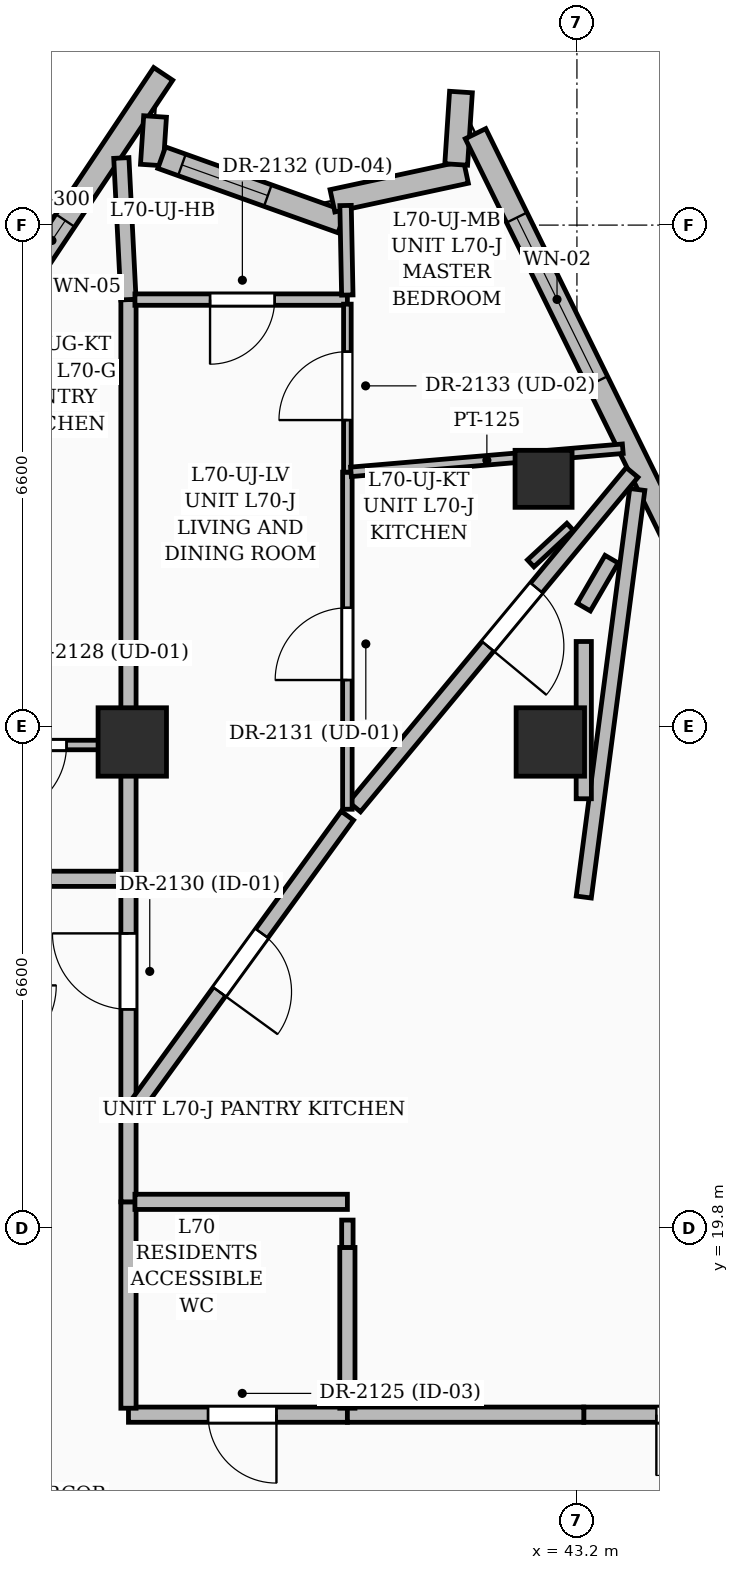
"""IFC4 building model, lengths in metres.
Left out: names, types, materials, properties, quantities, classifications, styles, units other than length and angle.
Written with IfcOpenShell. Run it as: python <this file> out.ifc"""

import sys

from ifc_helpers import new_model, si_unit, direction, frame, frame_2d, origin, origin_2d, place, context, subcontext, project, spatial, rectangle, extrude, element, fill, save


model = new_model("IFC4")
c1 = context("Model", 3, precision=1e-05, world=origin(), true_north=direction((0.0, 1.0)))
c2 = subcontext(c1, "Body", "Model", "MODEL_VIEW")
j1 = project(units=[si_unit("LENGTHUNIT", "METRE"), si_unit("PLANEANGLEUNIT", "RADIAN")], contexts=[c1])
p1 = place(None, origin())
s1 = spatial("IfcSite", under=j1, at=p1, CompositionType="ELEMENT")
p2 = place(p1, origin())
s2 = spatial("IfcBuilding", under=s1, at=p2, CompositionType="ELEMENT")
p3 = place(p2, frame((0.0, 0.0, 270.75)))
s3 = spatial("IfcBuildingStorey", under=s2, at=p3, CompositionType="ELEMENT", Elevation=270.75)
for number, where, z_axis, x_axis in (
    (1, (42.85, 26.2, 0.0), (0.0, 0.0, 1.0), (1.0, 0.0, 0.0)),
    (2, (37.35, 26.2, 0.0), (0.0, 0.0, 1.0), (1.0, 0.0, 0.0)),
):
    element("IfcColumn", number, at=place(p3, frame(where, z_axis=z_axis, x_axis=x_axis)), inside=s3, PredefinedType="COLUMN", context=c2, shape_type="SweptSolid", body=[
        extrude(rectangle(XDim=0.9, YDim=0.9, at=origin_2d()), origin(), (0.0, 0.0, 1.0), 3.75),
    ])
p4 = place(p3, frame((42.761, 29.662, 0.0), z_axis=(0.0, 0.0, 1.0), x_axis=(1.0, 0.0, 0.0)))
e3 = element("IfcColumn", 3, at=p4, inside=s3, PredefinedType="COLUMN", context=c2, shape_type="SweptSolid", body=[
    extrude(rectangle(XDim=0.75, YDim=0.75, at=origin_2d()), origin(), (0.0, 0.0, 1.0), 3.75),
])
p5 = place(p3, frame((34.831, 30.606, 0.0), z_axis=(0.0, 0.0, 1.0), x_axis=(0.555223932881, 0.831700898374, 0.0)))
e4 = element("IfcWall", 4, at=p5, inside=s3, PredefinedType="SOLIDWALL", context=c2, shape_type="SweptSolid", body=[
    extrude(rectangle(XDim=5.27, YDim=0.3, at=frame_2d((2.635, 0.0))), origin(), (0.0, 0.0, 1.0), 3.5),
])
p6 = place(p5, frame((0.85, 0.0, 0.55)))
e5 = element("IfcOpeningElement", 5, at=p6, cuts=e4, PredefinedType="OPENING", context=c2, shape_type="SweptSolid", body=[
    extrude(rectangle(XDim=2.1, YDim=2.4, at=frame_2d((1.05, 1.2))), frame((0.0, 0.16, 0.0), z_axis=(0.0, -1.0, 0.0), x_axis=(1.0, 0.0, 0.0)), (0.0, 0.0, 1.0), 0.32),
])
p7 = place(p3, frame((37.65, 34.429, 0.0), z_axis=(0.0, 0.0, 1.0), x_axis=(-0.065607578869, -0.997845501866, 0.0)))
e6 = element("IfcWall", 6, at=p7, inside=s3, PredefinedType="SOLIDWALL", context=c2, shape_type="SweptSolid", body=[
    extrude(rectangle(XDim=0.64, YDim=0.3, at=frame_2d((0.32, 0.0))), origin(), (0.0, 0.0, 1.0), 3.5),
])
p8 = place(p3, frame((37.737, 33.887, 0.0), z_axis=(0.0, 0.0, 1.0), x_axis=(0.941667304475, -0.33654522383, 0.0)))
e7 = element("IfcWall", 7, at=p8, inside=s3, PredefinedType="SOLIDWALL", context=c2, shape_type="SweptSolid", body=[
    extrude(rectangle(XDim=2.518, YDim=0.3, at=frame_2d((1.259, 0.0))), origin(), (0.0, 0.0, 1.0), 3.5),
])
p9 = place(p8, frame((0.283, 0.0, 0.8)))
e8 = element("IfcOpeningElement", 8, at=p9, cuts=e7, PredefinedType="OPENING", context=c2, shape_type="SweptSolid", body=[
    extrude(rectangle(XDim=1.2, YDim=1.8, at=frame_2d((0.6, 0.9))), frame((0.0, 0.16, 0.0), z_axis=(0.0, -1.0, 0.0), x_axis=(1.0, 0.0, 0.0)), (0.0, 0.0, 1.0), 0.32),
])
p10 = place(p3, frame((39.984, 33.319, 0.0), z_axis=(0.0, 0.0, 1.0), x_axis=(0.977595119272, 0.210494139526, 0.0)))
e9 = element("IfcWall", 9, at=p10, inside=s3, PredefinedType="SOLIDWALL", context=c2, shape_type="SweptSolid", body=[
    extrude(rectangle(XDim=1.797, YDim=0.3, at=frame_2d((0.898, 0.0))), origin(), (0.0, 0.0, 1.0), 3.5),
])
p11 = place(p3, frame((41.612, 33.798, 0.0), z_axis=(0.0, 0.0, 1.0), x_axis=(0.065687740424, 0.997840228072, 0.0)))
e10 = element("IfcWall", 10, at=p11, inside=s3, PredefinedType="SOLIDWALL", context=c2, shape_type="SweptSolid", body=[
    extrude(rectangle(XDim=0.955, YDim=0.3, at=frame_2d((0.478, 0.0))), origin(), (0.0, 0.0, 1.0), 3.5),
])
p12 = place(p3, frame((41.866, 34.203, 0.0), z_axis=(0.0, 0.0, 1.0), x_axis=(0.44130789532, -0.897355749705, 0.0)))
e11 = element("IfcWall", 11, at=p12, inside=s3, PredefinedType="SOLIDWALL", context=c2, shape_type="SweptSolid", body=[
    extrude(rectangle(XDim=6.029, YDim=0.3, at=frame_2d((3.015, 0.0))), origin(), (0.0, 0.0, 1.0), 3.5),
])
p13 = place(p12, frame((1.23, 0.0, 0.6)))
e12 = element("IfcOpeningElement", 12, at=p13, cuts=e11, PredefinedType="OPENING", context=c2, shape_type="SweptSolid", body=[
    extrude(rectangle(XDim=2.4, YDim=2.1, at=frame_2d((1.2, 1.05))), frame((0.0, 0.16, 0.0), z_axis=(0.0, -1.0, 0.0), x_axis=(1.0, 0.0, 0.0)), (0.0, 0.0, 1.0), 0.32),
])
p14 = place(p3, frame((46.715, 17.35, 0.0), z_axis=(0.0, 0.0, 1.0), x_axis=(-1.0, 0.0, 0.0)))
e13 = element("IfcWall", 13, at=p14, inside=s3, PredefinedType="PARTITIONING", context=c2, shape_type="SweptSolid", body=[
    extrude(rectangle(XDim=3.425, YDim=0.2, at=frame_2d((1.712, 0.0))), origin(), (0.0, 0.0, 1.0), 2.685),
])
p15 = place(p14, frame((0.87, 0.0, 0.0)))
e14 = element("IfcOpeningElement", 14, at=p15, cuts=e13, PredefinedType="OPENING", context=c2, shape_type="SweptSolid", body=[
    extrude(rectangle(XDim=1.6, YDim=2.3, at=frame_2d((0.8, 1.15))), frame((0.0, 0.11, 0.0), z_axis=(0.0, -1.0, 0.0), x_axis=(1.0, 0.0, 0.0)), (0.0, 0.0, 1.0), 0.22),
])
p16 = place(p3, frame((37.255, 24.4, 0.0), z_axis=(0.0, 0.0, 1.0), x_axis=(-1.0, 0.0, 0.0)))
e15 = element("IfcWall", 15, at=p16, inside=s3, PredefinedType="PARTITIONING", context=c2, shape_type="SweptSolid", body=[
    extrude(rectangle(XDim=1.905, YDim=0.2, at=frame_2d((0.952, 0.0))), origin(), (0.0, 0.0, 1.0), 2.685),
])
p17 = place(p3, frame((40.18, 17.35, 0.0), z_axis=(0.0, 0.0, 1.0), x_axis=(-1.0, 0.0, 0.0)))
e16 = element("IfcWall", 16, at=p17, inside=s3, PredefinedType="PARTITIONING", context=c2, shape_type="SweptSolid", body=[
    extrude(rectangle(XDim=2.88, YDim=0.2, at=frame_2d((1.44, 0.0))), origin(), (0.0, 0.0, 1.0), 3.5),
])
p18 = place(p17, frame((0.933, 0.0, 0.0)))
e17 = element("IfcOpeningElement", 17, at=p18, cuts=e16, PredefinedType="OPENING", context=c2, shape_type="SweptSolid", body=[
    extrude(rectangle(XDim=0.9, YDim=2.1, at=frame_2d((0.45, 1.05))), frame((0.0, 0.11, 0.0), z_axis=(0.0, -1.0, 0.0), x_axis=(1.0, 0.0, 0.0)), (0.0, 0.0, 1.0), 0.22),
])
p19 = place(p3, frame((37.3, 17.435, 0.0), z_axis=(0.0, 0.0, 1.0), x_axis=(0.0, 1.0, 0.0)))
e18 = element("IfcWall", 18, at=p19, inside=s3, PredefinedType="PARTITIONING", context=c2, shape_type="SweptSolid", body=[
    extrude(rectangle(XDim=2.715, YDim=0.2, at=frame_2d((1.357, 0.0))), origin(), (0.0, 0.0, 1.0), 3.5),
])
p20 = place(p3, frame((37.3, 20.15, 0.0), z_axis=(0.0, 0.0, 1.0), x_axis=(0.0, 1.0, 0.0)))
e19 = element("IfcWall", 19, at=p20, inside=s3, PredefinedType="PARTITIONING", context=c2, shape_type="SweptSolid", body=[
    extrude(rectangle(XDim=1.12, YDim=0.2, at=frame_2d((0.56, 0.0))), origin(), (0.0, 0.0, 1.0), 3.5),
])
p21 = place(p3, frame((43.29, 17.35, 0.0), z_axis=(0.0, 0.0, 1.0), x_axis=(-1.0, 0.0, 0.0)))
e20 = element("IfcWall", 20, at=p21, inside=s3, PredefinedType="PARTITIONING", context=c2, shape_type="SweptSolid", body=[
    extrude(rectangle(XDim=3.11, YDim=0.2, at=frame_2d((1.555, 0.0))), origin(), (0.0, 0.0, 1.0), 3.5),
])
p22 = place(p3, frame((37.3, 21.48, 0.0), z_axis=(0.0, 0.0, 1.0), x_axis=(0.0, 1.0, 0.0)))
e21 = element("IfcWall", 21, at=p22, inside=s3, PredefinedType="PARTITIONING", context=c2, shape_type="SweptSolid", body=[
    extrude(rectangle(XDim=2.835, YDim=0.2, at=frame_2d((1.417, 0.0))), origin(), (0.0, 0.0, 1.0), 3.5),
])
p23 = place(p22, frame((1.202, 0.0, 0.0)))
e22 = element("IfcOpeningElement", 22, at=p23, cuts=e21, PredefinedType="OPENING", context=c2, shape_type="SweptSolid", body=[
    extrude(rectangle(XDim=1.0, YDim=2.2, at=frame_2d((0.5, 1.1))), frame((0.0, 0.11, 0.0), z_axis=(0.0, -1.0, 0.0), x_axis=(1.0, 0.0, 0.0)), (0.0, 0.0, 1.0), 0.22),
])
p24 = place(p3, frame((43.994, 29.522, 0.0), z_axis=(0.0, 0.0, 1.0), x_axis=(-0.130149716282, -0.991494352657, 0.0)))
e23 = element("IfcWall", 23, at=p24, inside=s3, PredefinedType="PARTITIONING", context=c2, shape_type="SweptSolid", body=[
    extrude(rectangle(XDim=5.408, YDim=0.2, at=frame_2d((2.704, 0.0))), origin(), (0.0, 0.0, 1.0), 2.685),
])
p25 = place(p3, frame((37.3, 26.16, 0.0), z_axis=(0.0, 0.0, 1.0), x_axis=(-1.0, 0.0, 0.0)))
e24 = element("IfcWall", 24, at=p25, inside=s3, PredefinedType="PARTITIONING", context=c2, shape_type="SweptSolid", body=[
    extrude(rectangle(XDim=2.58, YDim=0.125, at=frame_2d((1.29, 0.0))), origin(), (0.0, 0.0, 1.0), 2.862),
])
p26 = place(p25, frame((0.815, 0.0, 0.0)))
e25 = element("IfcOpeningElement", 25, at=p26, cuts=e24, PredefinedType="OPENING", context=c2, shape_type="SweptSolid", body=[
    extrude(rectangle(XDim=0.95, YDim=2.2, at=frame_2d((0.475, 1.1))), frame((0.0, 0.072, 0.0), z_axis=(0.0, -1.0, 0.0), x_axis=(1.0, 0.0, 0.0)), (0.0, 0.0, 1.0), 0.145),
])
p27 = place(p3, frame((37.3, 24.32, 0.0), z_axis=(0.0, 0.0, 1.0), x_axis=(0.0, 1.0, 0.0)))
e26 = element("IfcWall", 26, at=p27, inside=s3, PredefinedType="PARTITIONING", context=c2, shape_type="SweptSolid", body=[
    extrude(rectangle(XDim=1.792, YDim=0.2, at=frame_2d((0.896, 0.0))), origin(), (0.0, 0.0, 1.0), 2.685),
])
p28 = place(p3, frame((37.3, 26.208, 0.0), z_axis=(0.0, 0.0, 1.0), x_axis=(0.0, 1.0, 0.0)))
e27 = element("IfcWall", 27, at=p28, inside=s3, PredefinedType="PARTITIONING", context=c2, shape_type="SweptSolid", body=[
    extrude(rectangle(XDim=5.812, YDim=0.2, at=frame_2d((2.906, 0.0))), origin(), (0.0, 0.0, 1.0), 2.691),
])
p29 = place(p3, frame((37.3, 32.02, 0.0), z_axis=(0.0, 0.0, 1.0), x_axis=(-0.050388014823, 0.998729717172, 0.0)))
e28 = element("IfcWall", 28, at=p29, inside=s3, PredefinedType="PARTITIONING", context=c2, shape_type="SweptSolid", body=[
    extrude(rectangle(XDim=1.865, YDim=0.2, at=frame_2d((0.933, 0.0))), origin(), (0.0, 0.0, 1.0), 3.5),
])
p30 = place(p3, frame((40.18, 20.15, 0.0), z_axis=(0.0, 0.0, 1.0), x_axis=(-1.0, 0.0, 0.0)))
e29 = element("IfcWall", 29, at=p30, inside=s3, PredefinedType="PARTITIONING", context=c2, shape_type="SweptSolid", body=[
    extrude(rectangle(XDim=2.795, YDim=0.2, at=frame_2d((1.397, 0.0))), origin(), (0.0, 0.0, 1.0), 3.5),
])
p31 = place(p3, frame((40.18, 17.435, 0.0), z_axis=(0.0, 0.0, 1.0), x_axis=(0.0, 1.0, 0.0)))
e30 = element("IfcWall", 30, at=p31, inside=s3, PredefinedType="PARTITIONING", context=c2, shape_type="SweptSolid", body=[
    extrude(rectangle(XDim=2.115, YDim=0.2, at=frame_2d((1.058, 0.0))), origin(), (0.0, 0.0, 1.0), 3.5),
])
p32 = place(p3, frame((40.18, 25.23, 0.0), z_axis=(0.0, 0.0, 1.0), x_axis=(-0.588138509847, -0.808760219864, 0.0)))
e31 = element("IfcWall", 31, at=p32, inside=s3, PredefinedType="PARTITIONING", context=c2, shape_type="SweptSolid", body=[
    extrude(rectangle(XDim=4.812, YDim=0.2, at=frame_2d((2.406, 0.0))), origin(), (0.0, 0.0, 1.0), 3.5),
])
p33 = place(p32, frame((1.914, 0.0, 0.0)))
e32 = element("IfcOpeningElement", 32, at=p33, cuts=e31, PredefinedType="OPENING", context=c2, shape_type="SweptSolid", body=[
    extrude(rectangle(XDim=0.95, YDim=2.2, at=frame_2d((0.475, 1.1))), frame((0.0, 0.11, 0.0), z_axis=(0.0, -1.0, 0.0), x_axis=(1.0, 0.0, 0.0)), (0.0, 0.0, 1.0), 0.22),
])
p34 = place(p3, frame((43.926, 29.746, 0.0), z_axis=(0.0, 0.0, 1.0), x_axis=(-0.638469156573, -0.769647410251, 0.0)))
e33 = element("IfcWall", 33, at=p34, inside=s3, PredefinedType="PARTITIONING", context=c2, shape_type="SweptSolid", body=[
    extrude(rectangle(XDim=5.718, YDim=0.2, at=frame_2d((2.859, 0.0))), origin(), (0.0, 0.0, 1.0), 2.685),
])
p35 = place(p34, frame((1.972, 0.0, 0.0)))
e34 = element("IfcOpeningElement", 34, at=p35, cuts=e33, PredefinedType="OPENING", context=c2, shape_type="SweptSolid", body=[
    extrude(rectangle(XDim=1.0, YDim=2.2, at=frame_2d((0.5, 1.1))), frame((0.0, 0.11, 0.0), z_axis=(0.0, -1.0, 0.0), x_axis=(1.0, 0.0, 0.0)), (0.0, 0.0, 1.0), 0.22),
])
p36 = place(p3, frame((40.18, 32.02, 0.0), z_axis=(0.0, 0.0, 1.0), x_axis=(-1.0, 0.0, 0.0)))
e35 = element("IfcWall", 35, at=p36, inside=s3, PredefinedType="PARTITIONING", context=c2, shape_type="SweptSolid", body=[
    extrude(rectangle(XDim=2.795, YDim=0.15, at=frame_2d((1.397, 0.0))), origin(), (0.0, 0.0, 1.0), 3.5),
])
p37 = place(p36, frame((0.957, 0.0, 0.0)))
e36 = element("IfcOpeningElement", 36, at=p37, cuts=e35, PredefinedType="OPENING", context=c2, shape_type="SweptSolid", body=[
    extrude(rectangle(XDim=0.85, YDim=2.1, at=frame_2d((0.425, 1.05))), frame((0.0, 0.085, 0.0), z_axis=(0.0, -1.0, 0.0), x_axis=(1.0, 0.0, 0.0)), (0.0, 0.0, 1.0), 0.17),
])
p38 = place(p3, frame((40.18, 25.315, 0.0), z_axis=(0.0, 0.0, 1.0), x_axis=(0.0, 1.0, 0.0)))
e37 = element("IfcWall", 37, at=p38, inside=s3, PredefinedType="PARTITIONING", context=c2, shape_type="SweptSolid", body=[
    extrude(rectangle(XDim=4.435, YDim=0.125, at=frame_2d((2.218, 0.0))), origin(), (0.0, 0.0, 1.0), 2.685),
])
p39 = place(p38, frame((1.7, 0.0, 0.0)))
e38 = element("IfcOpeningElement", 38, at=p39, cuts=e37, PredefinedType="OPENING", context=c2, shape_type="SweptSolid", body=[
    extrude(rectangle(XDim=0.95, YDim=2.2, at=frame_2d((0.475, 1.1))), frame((0.0, 0.072, 0.0), z_axis=(0.0, -1.0, 0.0), x_axis=(1.0, 0.0, 0.0)), (0.0, 0.0, 1.0), 0.145),
])
p40 = place(p3, frame((40.18, 29.75, 0.0), z_axis=(0.0, 0.0, 1.0), x_axis=(0.0, 1.0, 0.0)))
e39 = element("IfcWall", 39, at=p40, inside=s3, PredefinedType="PARTITIONING", context=c2, shape_type="SweptSolid", body=[
    extrude(rectangle(XDim=2.21, YDim=0.1, at=frame_2d((1.105, 0.0))), origin(), (0.0, 0.0, 1.0), 3.5),
])
p41 = place(p40, frame((0.685, 0.0, 0.0)))
e40 = element("IfcOpeningElement", 40, at=p41, cuts=e39, PredefinedType="OPENING", context=c2, shape_type="SweptSolid", body=[
    extrude(rectangle(XDim=0.9, YDim=2.15, at=frame_2d((0.45, 1.075))), frame((0.0, 0.06, 0.0), z_axis=(0.0, -1.0, 0.0), x_axis=(1.0, 0.0, 0.0)), (0.0, 0.0, 1.0), 0.12),
])
p42 = place(p3, frame((40.179, 32.08, 0.0), z_axis=(0.0, 0.0, 1.0), x_axis=(-0.019685303924, 0.99980622563, 0.0)))
e41 = element("IfcWall", 41, at=p42, inside=s3, PredefinedType="PARTITIONING", context=c2, shape_type="SweptSolid", body=[
    extrude(rectangle(XDim=1.178, YDim=0.15, at=frame_2d((0.589, 0.0))), origin(), (0.0, 0.0, 1.0), 3.5),
])
p43 = place(p3, frame((43.803, 30.058, 0.0), z_axis=(0.0, 0.0, 1.0), x_axis=(-0.996400697419, -0.08476821446, 0.0)))
e42 = element("IfcWall", 42, at=p43, inside=s3, PredefinedType="PARTITIONING", context=c2, shape_type="SweptSolid", body=[
    extrude(rectangle(XDim=3.589, YDim=0.125, at=frame_2d((1.794, 0.0))), origin(), (0.0, 0.0, 1.0), 2.691),
])
p44 = place(p3, frame((43.656, 28.605, 0.0), z_axis=(0.0, 0.0, 1.0), x_axis=(-0.501788224026, -0.864990507594, 0.0)))
e43 = element("IfcWall", 43, at=p44, inside=s3, PredefinedType="PARTITIONING", context=c2, shape_type="SweptSolid", body=[
    extrude(rectangle(XDim=0.729, YDim=0.2, at=frame_2d((0.365, 0.0))), origin(), (0.0, 0.0, 1.0), 2.691),
])
p45 = place(p3, frame((43.29, 27.522, 0.0), z_axis=(0.0, 0.0, 1.0), x_axis=(0.0, -1.0, 0.0)))
e44 = element("IfcWall", 44, at=p45, inside=s3, PredefinedType="PARTITIONING", context=c2, shape_type="SweptSolid", body=[
    extrude(rectangle(XDim=2.069, YDim=0.2, at=frame_2d((1.035, 0.0))), origin(), (0.0, 0.0, 1.0), 2.685),
])
p46 = place(p3, frame((43.11, 29.031, 0.0), z_axis=(0.0, 0.0, 1.0), x_axis=(-0.732867291621, -0.680371613805, 0.0)))
e45 = element("IfcWall", 45, at=p46, inside=s3, PredefinedType="PARTITIONING", context=c2, shape_type="SweptSolid", body=[
    extrude(rectangle(XDim=0.707, YDim=0.125, at=frame_2d((0.354, 0.0))), origin(), (0.0, 0.0, 1.0), 2.691),
])
p47 = place(p3, frame((40.18, 19.55, 0.0), z_axis=(0.0, 0.0, 1.0), x_axis=(0.0, 1.0, 0.0)))
e46 = element("IfcWall", 46, at=p47, inside=s3, PredefinedType="PARTITIONING", context=c2, shape_type="SweptSolid", body=[
    extrude(rectangle(XDim=0.36, YDim=0.15, at=frame_2d((0.18, 0.0))), origin(), (0.0, 0.0, 1.0), 3.5),
])
p48 = place(p6, origin())
e47 = element("IfcWindow", 47, at=p48, inside=s3, PartitioningType="SINGLE_PANEL", PredefinedType="WINDOW", context=c2, shape_type="SweptSolid", body=[
    extrude(rectangle(XDim=2.1, YDim=2.4, at=frame_2d((1.05, 1.2))), frame((0.0, 0.03, 0.0), z_axis=(0.0, -1.0, 0.0), x_axis=(1.0, 0.0, 0.0)), (0.0, 0.0, 1.0), 0.06),
])
fill(e5, e47)
p49 = place(p9, origin())
e48 = element("IfcWindow", 48, at=p49, inside=s3, PartitioningType="SINGLE_PANEL", PredefinedType="WINDOW", context=c2, shape_type="SweptSolid", body=[
    extrude(rectangle(XDim=1.2, YDim=1.8, at=frame_2d((0.6, 0.9))), frame((0.0, 0.03, 0.0), z_axis=(0.0, -1.0, 0.0), x_axis=(1.0, 0.0, 0.0)), (0.0, 0.0, 1.0), 0.06),
])
fill(e8, e48)
p50 = place(p13, origin())
e49 = element("IfcWindow", 49, at=p50, inside=s3, PartitioningType="SINGLE_PANEL", PredefinedType="WINDOW", context=c2, shape_type="SweptSolid", body=[
    extrude(rectangle(XDim=2.4, YDim=2.1, at=frame_2d((1.2, 1.05))), frame((0.0, 0.03, 0.0), z_axis=(0.0, -1.0, 0.0), x_axis=(1.0, 0.0, 0.0)), (0.0, 0.0, 1.0), 0.06),
])
fill(e12, e49)
p51 = place(p15, origin())
e50 = element("IfcDoor", 50, at=p51, inside=s3, OperationType="DOUBLE_DOOR_SINGLE_SWING", PredefinedType="DOOR", context=c2, shape_type="SweptSolid", body=[
    extrude(rectangle(XDim=1.6, YDim=2.3, at=frame_2d((0.8, 1.15))), frame((0.0, 0.025, 0.0), z_axis=(0.0, -1.0, 0.0), x_axis=(1.0, 0.0, 0.0)), (0.0, 0.0, 1.0), 0.05),
])
fill(e14, e50)
p52 = place(p18, origin())
e51 = element("IfcDoor", 51, at=p52, inside=s3, OperationType="SINGLE_SWING_LEFT", PredefinedType="DOOR", context=c2, shape_type="SweptSolid", body=[
    extrude(rectangle(XDim=0.9, YDim=2.1, at=frame_2d((0.45, 1.05))), frame((0.0, 0.025, 0.0), z_axis=(0.0, -1.0, 0.0), x_axis=(1.0, 0.0, 0.0)), (0.0, 0.0, 1.0), 0.05),
])
fill(e17, e51)
p53 = place(p26, origin())
e52 = element("IfcDoor", 52, at=p53, inside=s3, OperationType="SINGLE_SWING_RIGHT", PredefinedType="DOOR", context=c2, shape_type="SweptSolid", body=[
    extrude(rectangle(XDim=0.95, YDim=2.2, at=frame_2d((0.475, 1.1))), frame((0.0, 0.025, 0.0), z_axis=(0.0, -1.0, 0.0), x_axis=(1.0, 0.0, 0.0)), (0.0, 0.0, 1.0), 0.05),
])
fill(e25, e52)
p54 = place(p23, origin())
e53 = element("IfcDoor", 53, at=p54, inside=s3, OperationType="SINGLE_SWING_RIGHT", PredefinedType="DOOR", context=c2, shape_type="SweptSolid", body=[
    extrude(rectangle(XDim=1.0, YDim=2.2, at=frame_2d((0.5, 1.1))), frame((0.0, 0.025, 0.0), z_axis=(0.0, -1.0, 0.0), x_axis=(1.0, 0.0, 0.0)), (0.0, 0.0, 1.0), 0.05),
])
fill(e22, e53)
p55 = place(p39, origin())
e54 = element("IfcDoor", 54, at=p55, inside=s3, OperationType="SINGLE_SWING_LEFT", PredefinedType="DOOR", context=c2, shape_type="SweptSolid", body=[
    extrude(rectangle(XDim=0.95, YDim=2.2, at=frame_2d((0.475, 1.1))), frame((0.0, 0.025, 0.0), z_axis=(0.0, -1.0, 0.0), x_axis=(1.0, 0.0, 0.0)), (0.0, 0.0, 1.0), 0.05),
])
fill(e38, e54)
p56 = place(p37, origin())
e55 = element("IfcDoor", 55, at=p56, inside=s3, OperationType="SINGLE_SWING_RIGHT", PredefinedType="DOOR", context=c2, shape_type="SweptSolid", body=[
    extrude(rectangle(XDim=0.85, YDim=2.1, at=frame_2d((0.425, 1.05))), frame((0.0, 0.025, 0.0), z_axis=(0.0, -1.0, 0.0), x_axis=(1.0, 0.0, 0.0)), (0.0, 0.0, 1.0), 0.05),
])
fill(e36, e55)
p57 = place(p41, origin())
e56 = element("IfcDoor", 56, at=p57, inside=s3, OperationType="SINGLE_SWING_LEFT", PredefinedType="DOOR", context=c2, shape_type="SweptSolid", body=[
    extrude(rectangle(XDim=0.9, YDim=2.15, at=frame_2d((0.45, 1.075))), frame((0.0, 0.025, 0.0), z_axis=(0.0, -1.0, 0.0), x_axis=(1.0, 0.0, 0.0)), (0.0, 0.0, 1.0), 0.05),
])
fill(e40, e56)
p58 = place(p35, origin())
e57 = element("IfcDoor", 57, at=p58, inside=s3, OperationType="SINGLE_SWING_RIGHT", PredefinedType="DOOR", context=c2, shape_type="SweptSolid", body=[
    extrude(rectangle(XDim=1.0, YDim=2.2, at=frame_2d((0.5, 1.1))), frame((0.0, 0.025, 0.0), z_axis=(0.0, -1.0, 0.0), x_axis=(1.0, 0.0, 0.0)), (0.0, 0.0, 1.0), 0.05),
])
fill(e34, e57)
p59 = place(p33, origin())
e58 = element("IfcDoor", 58, at=p59, inside=s3, OperationType="SINGLE_SWING_RIGHT", PredefinedType="DOOR", context=c2, shape_type="SweptSolid", body=[
    extrude(rectangle(XDim=0.95, YDim=2.2, at=frame_2d((0.475, 1.1))), frame((0.0, 0.025, 0.0), z_axis=(0.0, -1.0, 0.0), x_axis=(1.0, 0.0, 0.0)), (0.0, 0.0, 1.0), 0.05),
])
fill(e32, e58)
save(model, sys.argv[1])
